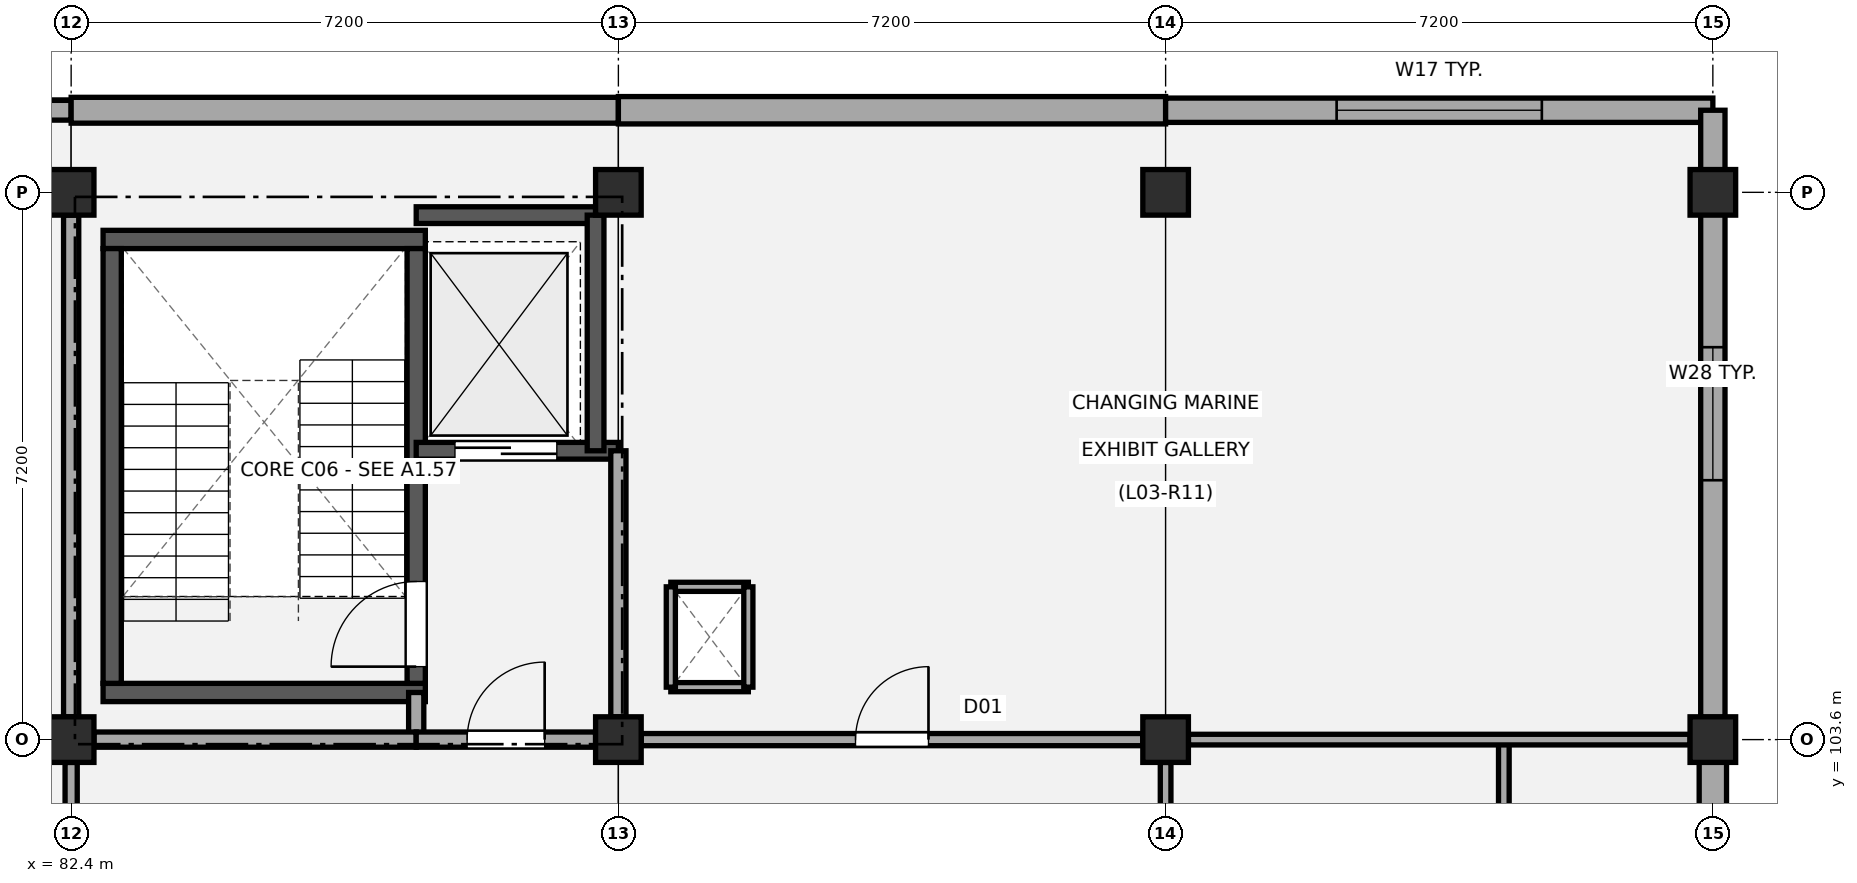
"""IFC4 building model, lengths in metres.
Left out: names, types, materials, properties, quantities, classifications, styles, units other than length and angle.
Written with IfcOpenShell. Run it as: python <this file> out.ifc"""

import sys

from ifc_helpers import new_model, si_unit, direction, frame, frame_2d, origin, origin_2d, place, context, subcontext, project, spatial, rectangle, extrude, element, fill, save


model = new_model("IFC4")
c1 = context("Model", 3, precision=1e-05, world=origin(), true_north=direction((0.0, 1.0)))
c2 = subcontext(c1, "Body", "Model", "MODEL_VIEW")
j1 = project(units=[si_unit("LENGTHUNIT", "METRE"), si_unit("PLANEANGLEUNIT", "RADIAN")], contexts=[c1])
p1 = place(None, origin())
s1 = spatial("IfcSite", under=j1, at=p1, CompositionType="ELEMENT")
p2 = place(p1, origin())
s2 = spatial("IfcBuilding", under=s1, at=p2, CompositionType="ELEMENT")
p3 = place(p2, frame((0.0, 0.0, 13.5)))
s3 = spatial("IfcBuildingStorey", under=s2, at=p3, CompositionType="ELEMENT", Elevation=13.5)
for number, where, z_axis, x_axis in (
    (1, (82.4, 103.6, 0.0), (0.0, 0.0, 1.0), (1.0, 0.0, 0.0)),
    (2, (82.4, 110.8, 0.0), (0.0, 0.0, 1.0), (1.0, 0.0, 0.0)),
    (3, (89.6, 103.6, 0.0), (0.0, 0.0, 1.0), (1.0, 0.0, 0.0)),
    (4, (89.6, 110.8, 0.0), (0.0, 0.0, 1.0), (1.0, 0.0, 0.0)),
    (5, (96.8, 103.6, 0.0), (0.0, 0.0, 1.0), (1.0, 0.0, 0.0)),
    (6, (96.8, 110.8, 0.0), (0.0, 0.0, 1.0), (1.0, 0.0, 0.0)),
    (7, (104.0, 103.6, 0.0), (0.0, 0.0, 1.0), (1.0, 0.0, 0.0)),
    (8, (104.0, 110.8, 0.0), (0.0, 0.0, 1.0), (1.0, 0.0, 0.0)),
):
    element("IfcColumn", number, at=place(p3, frame(where, z_axis=z_axis, x_axis=x_axis)), inside=s3, PredefinedType="COLUMN", context=c2, shape_type="SweptSolid", body=[
        extrude(rectangle(XDim=0.6, YDim=0.6, at=origin_2d()), origin(), (0.0, 0.0, 1.0), 4.14),
    ])
p4 = place(p3, frame((75.2, 111.88, 0.0), z_axis=(0.0, 0.0, 1.0), x_axis=(1.0, 0.0, 0.0)))
e9 = element("IfcWall", 9, at=p4, inside=s3, PredefinedType="STANDARD", context=c2, shape_type="SweptSolid", body=[
    extrude(rectangle(XDim=7.2, YDim=0.26, at=frame_2d((3.6, 0.0))), origin(), (0.0, 0.0, 1.0), 3.85),
])
p5 = place(p3, frame((82.4, 111.88, 0.0), z_axis=(0.0, 0.0, 1.0), x_axis=(1.0, 0.0, 0.0)))
e10 = element("IfcWall", 10, at=p5, inside=s3, PredefinedType="STANDARD", context=c2, shape_type="SweptSolid", body=[
    extrude(rectangle(XDim=7.2, YDim=0.34, at=frame_2d((3.6, 0.0))), origin(), (0.0, 0.0, 1.0), 3.87),
])
p6 = place(p3, frame((89.6, 111.88, 0.0), z_axis=(0.0, 0.0, 1.0), x_axis=(1.0, 0.0, 0.0)))
e11 = element("IfcWall", 11, at=p6, inside=s3, PredefinedType="STANDARD", context=c2, shape_type="SweptSolid", body=[
    extrude(rectangle(XDim=7.2, YDim=0.36, at=frame_2d((3.6, 0.0))), origin(), (0.0, 0.0, 1.0), 3.85),
])
p7 = place(p3, frame((96.8, 111.88, 0.0), z_axis=(0.0, 0.0, 1.0), x_axis=(1.0, 0.0, 0.0)))
e12 = element("IfcWall", 12, at=p7, inside=s3, PredefinedType="STANDARD", context=c2, shape_type="SweptSolid", body=[
    extrude(rectangle(XDim=7.2, YDim=0.32, at=frame_2d((3.6, 0.0))), origin(), (0.0, 0.0, 1.0), 3.87),
])
p8 = place(p7, frame((2.25, 0.0, 0.95)))
e13 = element("IfcOpeningElement", 13, at=p8, cuts=e12, PredefinedType="OPENING", context=c2, shape_type="SweptSolid", body=[
    extrude(rectangle(XDim=2.7, YDim=1.7, at=frame_2d((1.35, 0.85))), frame((0.0, 0.17, 0.0), z_axis=(0.0, -1.0, 0.0), x_axis=(1.0, 0.0, 0.0)), (0.0, 0.0, 1.0), 0.34),
])
p9 = place(p3, frame((104.0, 103.305, 0.0), z_axis=(0.0, 0.0, 1.0), x_axis=(0.0, -1.0, 0.0)))
e14 = element("IfcWall", 14, at=p9, inside=s3, PredefinedType="STANDARD", context=c2, shape_type="SweptSolid", body=[
    extrude(rectangle(XDim=6.61, YDim=0.36, at=frame_2d((3.305, 0.0))), origin(), (0.0, 0.0, 1.0), 3.32),
])
p10 = place(p3, frame((104.0, 111.88, 0.0), z_axis=(0.0, 0.0, 1.0), x_axis=(0.0, -1.0, 0.0)))
e15 = element("IfcWall", 15, at=p10, inside=s3, PredefinedType="STANDARD", context=c2, shape_type="SweptSolid", body=[
    extrude(rectangle(XDim=7.985, YDim=0.32, at=frame_2d((3.992, 0.0))), origin(), (0.0, 0.0, 1.0), 3.32),
])
p11 = place(p10, frame((3.117, 0.0, 0.95)))
e16 = element("IfcOpeningElement", 16, at=p11, cuts=e15, PredefinedType="OPENING", context=c2, shape_type="SweptSolid", body=[
    extrude(rectangle(XDim=1.75, YDim=1.3, at=frame_2d((0.875, 0.65))), frame((0.0, 0.17, 0.0), z_axis=(0.0, -1.0, 0.0), x_axis=(1.0, 0.0, 0.0)), (0.0, 0.0, 1.0), 0.34),
])
for number, where, z_axis, x_axis in (
    (17, (82.82, 104.22, 0.0), (0.0, 0.0, 1.0), (1.0, 0.0, 0.0)),
    (18, (82.82, 110.18, 0.0), (0.0, 0.0, 1.0), (1.0, 0.0, 0.0)),
):
    element("IfcWall", number, at=place(p3, frame(where, z_axis=z_axis, x_axis=x_axis)), inside=s3, PredefinedType="SHEAR", context=c2, shape_type="SweptSolid", body=[
        extrude(rectangle(XDim=4.24, YDim=0.24, at=frame_2d((2.12, 0.0))), origin(), (0.0, 0.0, 1.0), 3.88),
    ])
p12 = place(p3, frame((82.94, 104.34, 0.0), z_axis=(0.0, 0.0, 1.0), x_axis=(0.0, 1.0, 0.0)))
e19 = element("IfcWall", 19, at=p12, inside=s3, PredefinedType="SHEAR", context=c2, shape_type="SweptSolid", body=[
    extrude(rectangle(XDim=5.72, YDim=0.24, at=frame_2d((2.86, 0.0))), origin(), (0.0, 0.0, 1.0), 3.88),
])
p13 = place(p3, frame((86.94, 104.34, 0.0), z_axis=(0.0, 0.0, 1.0), x_axis=(0.0, 1.0, 0.0)))
e20 = element("IfcWall", 20, at=p13, inside=s3, PredefinedType="SHEAR", context=c2, shape_type="SweptSolid", body=[
    extrude(rectangle(XDim=5.72, YDim=0.24, at=frame_2d((2.86, 0.0))), origin(), (0.0, 0.0, 1.0), 3.88),
])
p14 = place(p13, frame((0.22, 0.0, 0.0)))
e21 = element("IfcOpeningElement", 21, at=p14, cuts=e20, PredefinedType="OPENING", context=c2, shape_type="SweptSolid", body=[
    extrude(rectangle(XDim=1.12, YDim=2.15, at=frame_2d((0.56, 1.075))), frame((0.0, 0.13, 0.0), z_axis=(0.0, -1.0, 0.0), x_axis=(1.0, 0.0, 0.0)), (0.0, 0.0, 1.0), 0.26),
])
p15 = place(p3, frame((86.94, 107.4, 0.0), z_axis=(0.0, 0.0, 1.0), x_axis=(1.0, 0.0, 0.0)))
e22 = element("IfcWall", 22, at=p15, inside=s3, PredefinedType="SHEAR", context=c2, shape_type="SweptSolid", body=[
    extrude(rectangle(XDim=2.66, YDim=0.22, at=frame_2d((1.33, 0.0))), origin(), (0.0, 0.0, 1.0), 3.88),
])
p16 = place(p15, frame((0.51, 0.0, 0.0)))
e23 = element("IfcOpeningElement", 23, at=p16, cuts=e22, PredefinedType="OPENING", context=c2, shape_type="SweptSolid", body=[
    extrude(rectangle(XDim=1.34, YDim=2.15, at=frame_2d((0.67, 1.075))), frame((0.0, 0.12, 0.0), z_axis=(0.0, -1.0, 0.0), x_axis=(1.0, 0.0, 0.0)), (0.0, 0.0, 1.0), 0.24),
])
p17 = place(p3, frame((86.94, 110.5, 0.0), z_axis=(0.0, 0.0, 1.0), x_axis=(1.0, 0.0, 0.0)))
e24 = element("IfcWall", 24, at=p17, inside=s3, PredefinedType="SHEAR", context=c2, shape_type="SweptSolid", body=[
    extrude(rectangle(XDim=2.36, YDim=0.22, at=frame_2d((1.18, 0.0))), origin(), (0.0, 0.0, 1.0), 3.88),
])
p18 = place(p3, frame((89.3, 107.4, 0.0), z_axis=(0.0, 0.0, 1.0), x_axis=(0.0, 1.0, 0.0)))
e25 = element("IfcWall", 25, at=p18, inside=s3, PredefinedType="SHEAR", context=c2, shape_type="SweptSolid", body=[
    extrude(rectangle(XDim=3.1, YDim=0.22, at=frame_2d((1.55, 0.0))), origin(), (0.0, 0.0, 1.0), 3.88),
])
p19 = place(p3, frame((86.94, 103.6, 0.0), z_axis=(0.0, 0.0, 1.0), x_axis=(0.0, 1.0, 0.0)))
e26 = element("IfcWall", 26, at=p19, inside=s3, PredefinedType="PARTITIONING", context=c2, shape_type="SweptSolid", body=[
    extrude(rectangle(XDim=0.62, YDim=0.2, at=frame_2d((0.31, 0.0))), origin(), (0.0, 0.0, 1.0), 3.27),
])
p20 = place(p3, frame((82.4, 103.9, 0.0), z_axis=(0.0, 0.0, 1.0), x_axis=(0.0, 1.0, 0.0)))
e27 = element("IfcWall", 27, at=p20, inside=s3, PredefinedType="PARTITIONING", context=c2, shape_type="SweptSolid", body=[
    extrude(rectangle(XDim=6.6, YDim=0.2, at=frame_2d((3.3, 0.0))), origin(), (0.0, 0.0, 1.0), 3.2),
])
p21 = place(p3, frame((89.6, 103.9, 0.0), z_axis=(0.0, 0.0, 1.0), x_axis=(0.0, 1.0, 0.0)))
e28 = element("IfcWall", 28, at=p21, inside=s3, PredefinedType="PARTITIONING", context=c2, shape_type="SweptSolid", body=[
    extrude(rectangle(XDim=3.5, YDim=0.2, at=frame_2d((1.75, 0.0))), origin(), (0.0, 0.0, 1.0), 3.2),
])
p22 = place(p3, frame((82.7, 103.6, 0.0), z_axis=(0.0, 0.0, 1.0), x_axis=(1.0, 0.0, 0.0)))
e29 = element("IfcWall", 29, at=p22, inside=s3, PredefinedType="PARTITIONING", context=c2, shape_type="SweptSolid", body=[
    extrude(rectangle(XDim=4.24, YDim=0.2, at=frame_2d((2.12, 0.0))), origin(), (0.0, 0.0, 1.0), 3.27),
])
p23 = place(p3, frame((86.94, 103.6, 0.0), z_axis=(0.0, 0.0, 1.0), x_axis=(1.0, 0.0, 0.0)))
e30 = element("IfcWall", 30, at=p23, inside=s3, PredefinedType="PARTITIONING", context=c2, shape_type="SweptSolid", body=[
    extrude(rectangle(XDim=2.36, YDim=0.2, at=frame_2d((1.18, 0.0))), origin(), (0.0, 0.0, 1.0), 3.27),
])
p24 = place(p23, frame((0.67, 0.0, 0.0)))
e31 = element("IfcOpeningElement", 31, at=p24, cuts=e30, PredefinedType="OPENING", context=c2, shape_type="SweptSolid", body=[
    extrude(rectangle(XDim=1.02, YDim=2.15, at=frame_2d((0.51, 1.075))), frame((0.0, 0.11, 0.0), z_axis=(0.0, -1.0, 0.0), x_axis=(1.0, 0.0, 0.0)), (0.0, 0.0, 1.0), 0.22),
])
for number, where, z_axis, x_axis in (
    (32, (90.29, 104.29, 0.0), (0.0, 0.0, 1.0), (1.0, 0.0, 0.0)),
    (33, (90.29, 105.61, 0.0), (0.0, 0.0, 1.0), (1.0, 0.0, 0.0)),
):
    element("IfcWall", number, at=place(p3, frame(where, z_axis=z_axis, x_axis=x_axis)), inside=s3, PredefinedType="PARTITIONING", context=c2, shape_type="SweptSolid", body=[
        extrude(rectangle(XDim=1.02, YDim=0.12, at=frame_2d((0.51, 0.0))), origin(), (0.0, 0.0, 1.0), 3.84),
    ])
for number, where, z_axis, x_axis in (
    (34, (90.29, 104.29, 0.0), (0.0, 0.0, 1.0), (0.0, 1.0, 0.0)),
    (35, (91.31, 104.29, 0.0), (0.0, 0.0, 1.0), (0.0, 1.0, 0.0)),
):
    element("IfcWall", number, at=place(p3, frame(where, z_axis=z_axis, x_axis=x_axis)), inside=s3, PredefinedType="PARTITIONING", context=c2, shape_type="SweptSolid", body=[
        extrude(rectangle(XDim=1.32, YDim=0.12, at=frame_2d((0.66, 0.0))), origin(), (0.0, 0.0, 1.0), 3.84),
    ])
p25 = place(p3, frame((101.25, 96.4, 0.0), z_axis=(0.0, 0.0, 1.0), x_axis=(0.0, 1.0, 0.0)))
e36 = element("IfcWall", 36, at=p25, inside=s3, PredefinedType="PARTITIONING", context=c2, shape_type="SweptSolid", body=[
    extrude(rectangle(XDim=7.2, YDim=0.14, at=frame_2d((3.6, 0.0))), origin(), (0.0, 0.0, 1.0), 3.3),
])
p26 = place(p3, frame((97.1, 103.6, 0.0), z_axis=(0.0, 0.0, 1.0), x_axis=(1.0, 0.0, 0.0)))
e37 = element("IfcWall", 37, at=p26, inside=s3, PredefinedType="PARTITIONING", context=c2, shape_type="SweptSolid", body=[
    extrude(rectangle(XDim=6.6, YDim=0.14, at=frame_2d((3.3, 0.0))), origin(), (0.0, 0.0, 1.0), 3.27),
])
p27 = place(p3, frame((96.8, 96.7, 0.0), z_axis=(0.0, 0.0, 1.0), x_axis=(0.0, 1.0, 0.0)))
e38 = element("IfcWall", 38, at=p27, inside=s3, PredefinedType="PARTITIONING", context=c2, shape_type="SweptSolid", body=[
    extrude(rectangle(XDim=6.6, YDim=0.14, at=frame_2d((3.3, 0.0))), origin(), (0.0, 0.0, 1.0), 3.25),
])
p28 = place(p3, frame((82.4, 96.7, 0.0), z_axis=(0.0, 0.0, 1.0), x_axis=(0.0, 1.0, 0.0)))
e39 = element("IfcWall", 39, at=p28, inside=s3, PredefinedType="PARTITIONING", context=c2, shape_type="SweptSolid", body=[
    extrude(rectangle(XDim=6.6, YDim=0.16, at=frame_2d((3.3, 0.0))), origin(), (0.0, 0.0, 1.0), 3.25),
])
p29 = place(p28, frame((2.27, 0.0, 0.0)))
e40 = element("IfcOpeningElement", 40, at=p29, cuts=e39, PredefinedType="OPENING", context=c2, shape_type="SweptSolid", body=[
    extrude(rectangle(XDim=2.06, YDim=2.28, at=frame_2d((1.03, 1.14))), frame((0.0, 0.09, 0.0), z_axis=(0.0, -1.0, 0.0), x_axis=(1.0, 0.0, 0.0)), (0.0, 0.0, 1.0), 0.18),
])
p30 = place(p3, frame((89.9, 103.6, 0.0), z_axis=(0.0, 0.0, 1.0), x_axis=(1.0, 0.0, 0.0)))
e41 = element("IfcWall", 41, at=p30, inside=s3, PredefinedType="PARTITIONING", context=c2, shape_type="SweptSolid", body=[
    extrude(rectangle(XDim=6.6, YDim=0.16, at=frame_2d((3.3, 0.0))), origin(), (0.0, 0.0, 1.0), 3.2),
])
p31 = place(p30, frame((2.82, 0.0, 0.0)))
e42 = element("IfcOpeningElement", 42, at=p31, cuts=e41, PredefinedType="OPENING", context=c2, shape_type="SweptSolid", body=[
    extrude(rectangle(XDim=0.96, YDim=2.1, at=frame_2d((0.48, 1.05))), frame((0.0, 0.09, 0.0), z_axis=(0.0, -1.0, 0.0), x_axis=(1.0, 0.0, 0.0)), (0.0, 0.0, 1.0), 0.18),
])
p32 = place(p8, origin())
e43 = element("IfcWindow", 43, at=p32, inside=s3, PartitioningType="SINGLE_PANEL", PredefinedType="WINDOW", context=c2, shape_type="SweptSolid", body=[
    extrude(rectangle(XDim=2.7, YDim=1.7, at=frame_2d((1.35, 0.85))), frame((0.0, 0.03, 0.0), z_axis=(0.0, -1.0, 0.0), x_axis=(1.0, 0.0, 0.0)), (0.0, 0.0, 1.0), 0.06),
])
fill(e13, e43)
p33 = place(p11, origin())
e44 = element("IfcWindow", 44, at=p33, inside=s3, PartitioningType="SINGLE_PANEL", PredefinedType="WINDOW", context=c2, shape_type="SweptSolid", body=[
    extrude(rectangle(XDim=1.75, YDim=1.3, at=frame_2d((0.875, 0.65))), frame((0.0, 0.03, 0.0), z_axis=(0.0, -1.0, 0.0), x_axis=(1.0, 0.0, 0.0)), (0.0, 0.0, 1.0), 0.06),
])
fill(e16, e44)
p34 = place(p14, origin())
e45 = element("IfcDoor", 45, at=p34, inside=s3, OperationType="SINGLE_SWING_LEFT", PredefinedType="DOOR", context=c2, shape_type="SweptSolid", body=[
    extrude(rectangle(XDim=1.12, YDim=2.15, at=frame_2d((0.56, 1.075))), frame((0.0, 0.025, 0.0), z_axis=(0.0, -1.0, 0.0), x_axis=(1.0, 0.0, 0.0)), (0.0, 0.0, 1.0), 0.05),
])
fill(e21, e45)
p35 = place(p16, origin())
e46 = element("IfcDoor", 46, at=p35, inside=s3, OperationType="DOUBLE_DOOR_SLIDING", PredefinedType="DOOR", context=c2, shape_type="SweptSolid", body=[
    extrude(rectangle(XDim=1.34, YDim=2.15, at=frame_2d((0.67, 1.075))), frame((0.0, 0.025, 0.0), z_axis=(0.0, -1.0, 0.0), x_axis=(1.0, 0.0, 0.0)), (0.0, 0.0, 1.0), 0.05),
])
fill(e23, e46)
p36 = place(p24, origin())
e47 = element("IfcDoor", 47, at=p36, inside=s3, OperationType="SINGLE_SWING_RIGHT", PredefinedType="DOOR", context=c2, shape_type="SweptSolid", body=[
    extrude(rectangle(XDim=1.02, YDim=2.15, at=frame_2d((0.51, 1.075))), frame((0.0, 0.025, 0.0), z_axis=(0.0, -1.0, 0.0), x_axis=(1.0, 0.0, 0.0)), (0.0, 0.0, 1.0), 0.05),
])
fill(e31, e47)
p37 = place(p31, origin())
e48 = element("IfcDoor", 48, at=p37, inside=s3, OperationType="SINGLE_SWING_RIGHT", PredefinedType="DOOR", context=c2, shape_type="SweptSolid", body=[
    extrude(rectangle(XDim=0.96, YDim=2.1, at=frame_2d((0.48, 1.05))), frame((0.0, 0.025, 0.0), z_axis=(0.0, -1.0, 0.0), x_axis=(1.0, 0.0, 0.0)), (0.0, 0.0, 1.0), 0.05),
])
fill(e42, e48)
save(model, sys.argv[1])
